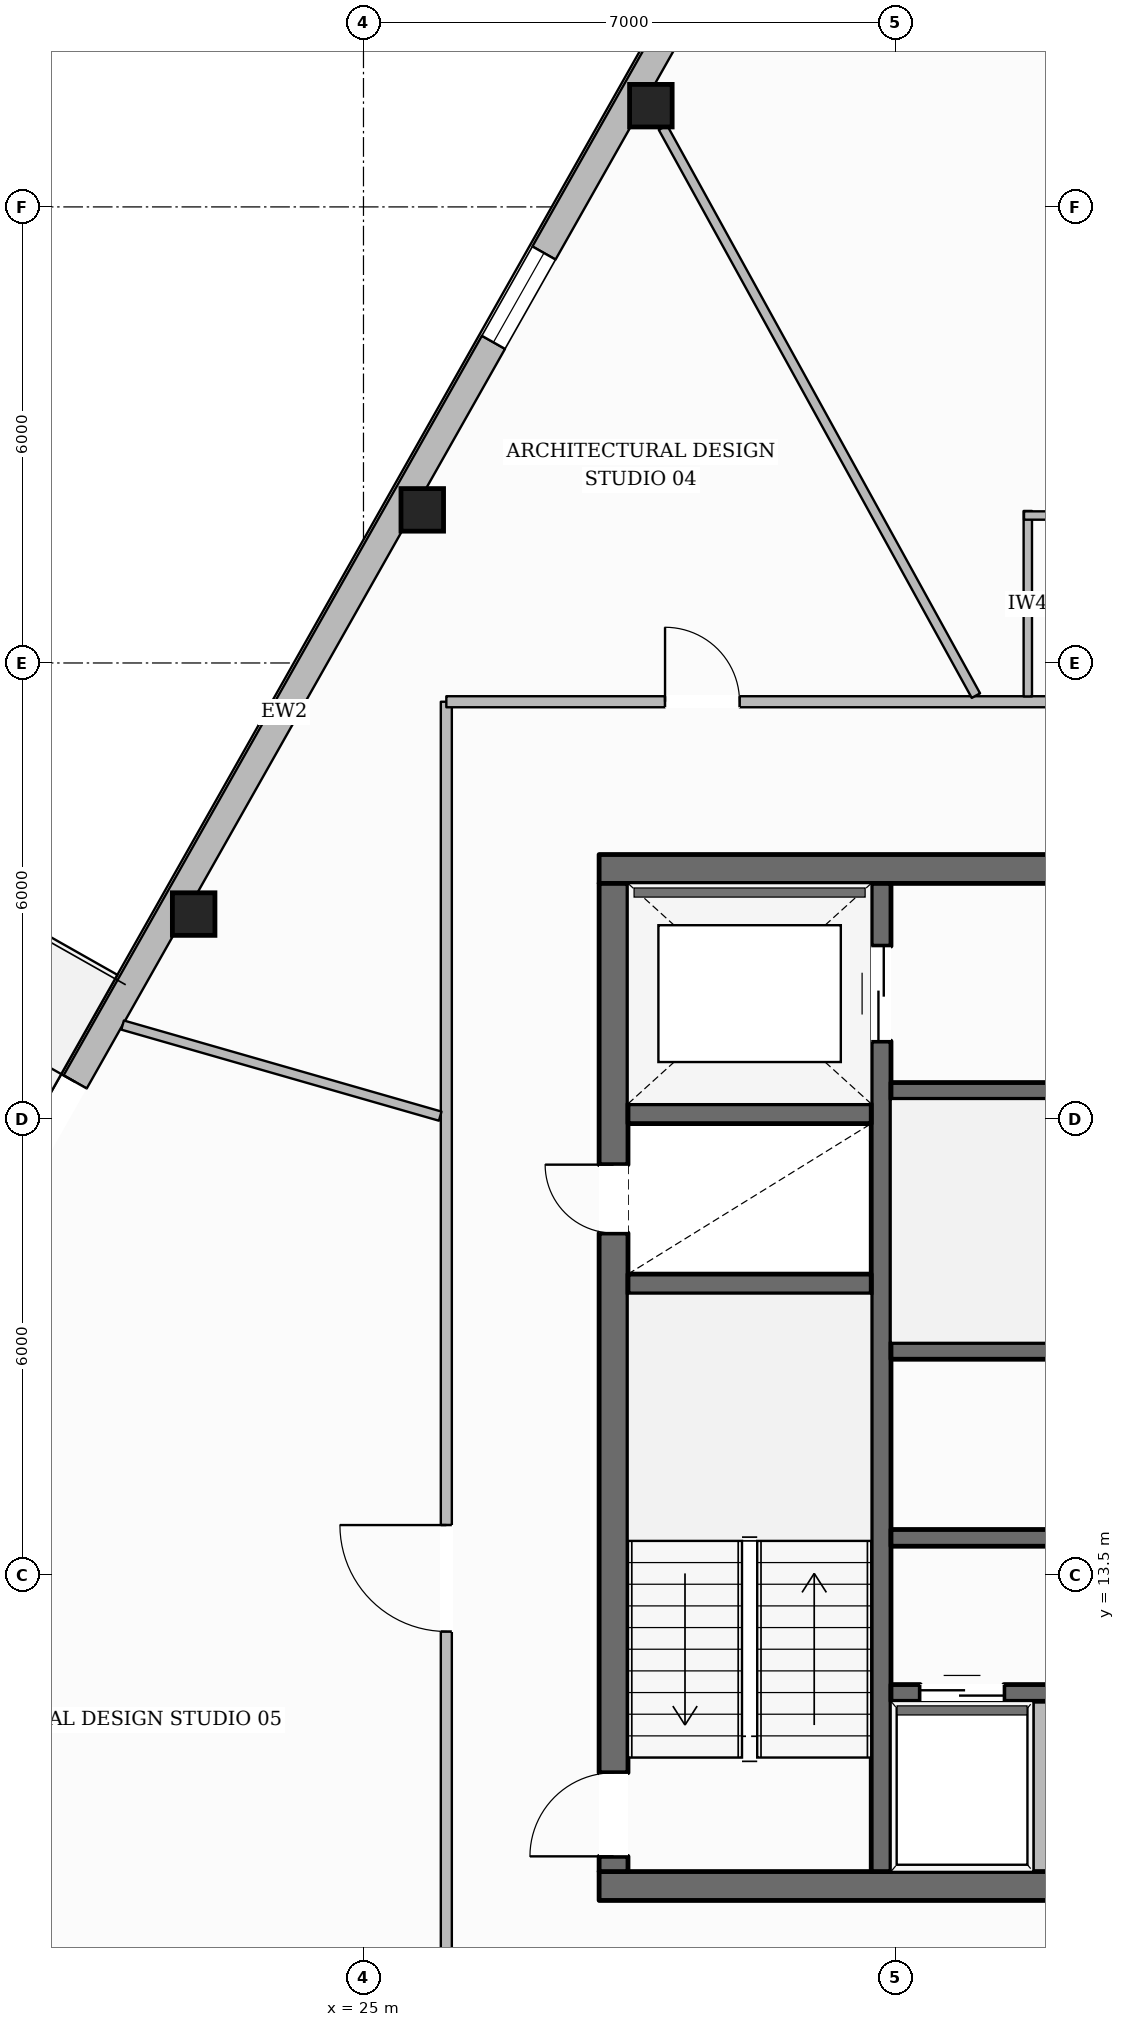
"""IFC4 building model, lengths in metres.
Left out: names, types, materials, properties, quantities, classifications, styles, units other than length and angle.
Written with IfcOpenShell. Run it as: python <this file> out.ifc"""

import sys

from ifc_helpers import new_model, si_unit, direction, frame, frame_2d, origin, origin_2d, place, context, subcontext, project, spatial, rectangle, hollow_rectangle, extrude, element, fill, save


model = new_model("IFC4")
c1 = context("Model", 3, precision=1e-05, world=origin(), true_north=direction((0.0, 1.0)))
c2 = subcontext(c1, "Body", "Model", "MODEL_VIEW")
j1 = project(units=[si_unit("LENGTHUNIT", "METRE"), si_unit("PLANEANGLEUNIT", "RADIAN")], contexts=[c1])
p1 = place(None, origin())
s1 = spatial("IfcSite", under=j1, at=p1, CompositionType="ELEMENT")
p2 = place(p1, origin())
s2 = spatial("IfcBuilding", under=s1, at=p2, CompositionType="ELEMENT")
p3 = place(p2, frame((0.0, 0.0, 247.2)))
s3 = spatial("IfcBuildingStorey", under=s2, at=p3, CompositionType="ELEMENT", Elevation=247.2)
p4 = place(p3, frame((28.1, 9.41, 0.0), z_axis=(0.0, 0.0, 1.0), x_axis=(1.0, 0.0, 0.0)))
e1 = element("IfcWall", 1, at=p4, inside=s3, PredefinedType="SOLIDWALL", context=c2, shape_type="SweptSolid", body=[
    extrude(rectangle(XDim=19.8, YDim=0.38, at=frame_2d((9.9, 0.0))), origin(), (0.0, 0.0, 1.0), 3.61),
])
p5 = place(p4, frame((10.4, 0.0, 0.0)))
e2 = element("IfcOpeningElement", 2, at=p5, cuts=e1, PredefinedType="OPENING", context=c2, shape_type="SweptSolid", body=[
    extrude(rectangle(XDim=1.4, YDim=2.2, at=frame_2d((0.7, 1.1))), frame((0.0, 0.2, 0.0), z_axis=(0.0, -1.0, 0.0), x_axis=(1.0, 0.0, 0.0)), (0.0, 0.0, 1.0), 0.4),
])
p6 = place(p3, frame((28.1, 22.79, 0.0), z_axis=(0.0, 0.0, 1.0), x_axis=(1.0, 0.0, 0.0)))
e3 = element("IfcWall", 3, at=p6, inside=s3, PredefinedType="SOLIDWALL", context=c2, shape_type="SweptSolid", body=[
    extrude(rectangle(XDim=19.8, YDim=0.38, at=frame_2d((9.9, 0.0))), origin(), (0.0, 0.0, 1.0), 3.61),
])
p7 = place(p6, frame((6.175, 0.0, 0.0)))
e4 = element("IfcOpeningElement", 4, at=p7, cuts=e3, PredefinedType="OPENING", context=c2, shape_type="SweptSolid", body=[
    extrude(rectangle(XDim=1.05, YDim=2.15, at=frame_2d((0.525, 1.075))), frame((0.0, 0.2, 0.0), z_axis=(0.0, -1.0, 0.0), x_axis=(1.0, 0.0, 0.0)), (0.0, 0.0, 1.0), 0.4),
])
p8 = place(p6, frame((12.575, 0.0, 0.0)))
e5 = element("IfcOpeningElement", 5, at=p8, cuts=e3, PredefinedType="OPENING", context=c2, shape_type="SweptSolid", body=[
    extrude(rectangle(XDim=1.05, YDim=2.15, at=frame_2d((0.525, 1.075))), frame((0.0, 0.2, 0.0), z_axis=(0.0, -1.0, 0.0), x_axis=(1.0, 0.0, 0.0)), (0.0, 0.0, 1.0), 0.4),
])
p9 = place(p3, frame((28.29, 9.6, 0.0), z_axis=(0.0, 0.0, 1.0), x_axis=(0.0, 1.0, 0.0)))
e6 = element("IfcWall", 6, at=p9, inside=s3, PredefinedType="SOLIDWALL", context=c2, shape_type="SweptSolid", body=[
    extrude(rectangle(XDim=13.0, YDim=0.38, at=frame_2d((6.5, 0.0))), origin(), (0.0, 0.0, 1.0), 3.61),
])
p10 = place(p9, frame((0.2, 0.0, 0.0)))
e7 = element("IfcOpeningElement", 7, at=p10, cuts=e6, PredefinedType="OPENING", context=c2, shape_type="SweptSolid", body=[
    extrude(rectangle(XDim=1.1, YDim=2.15, at=frame_2d((0.55, 1.075))), frame((0.0, 0.2, 0.0), z_axis=(0.0, -1.0, 0.0), x_axis=(1.0, 0.0, 0.0)), (0.0, 0.0, 1.0), 0.4),
])
p11 = place(p9, frame((8.4, 0.0, 0.0)))
e8 = element("IfcOpeningElement", 8, at=p11, cuts=e6, PredefinedType="OPENING", context=c2, shape_type="SweptSolid", body=[
    extrude(rectangle(XDim=0.9, YDim=2.1, at=frame_2d((0.45, 1.05))), frame((0.0, 0.2, 0.0), z_axis=(0.0, -1.0, 0.0), x_axis=(1.0, 0.0, 0.0)), (0.0, 0.0, 1.0), 0.4),
])
p12 = place(p3, frame((31.81, 9.6, 0.0), z_axis=(0.0, 0.0, 1.0), x_axis=(0.0, 1.0, 0.0)))
e9 = element("IfcWall", 9, at=p12, inside=s3, PredefinedType="SHEAR", context=c2, shape_type="SweptSolid", body=[
    extrude(rectangle(XDim=13.0, YDim=0.26, at=frame_2d((6.5, 0.0))), origin(), (0.0, 0.0, 1.0), 3.61),
])
p13 = place(p12, frame((10.925, 0.0, 0.0)))
e10 = element("IfcOpeningElement", 10, at=p13, cuts=e9, PredefinedType="OPENING", context=c2, shape_type="SweptSolid", body=[
    extrude(rectangle(XDim=1.25, YDim=2.25, at=frame_2d((0.625, 1.125))), frame((0.0, 0.14, 0.0), z_axis=(0.0, -1.0, 0.0), x_axis=(1.0, 0.0, 0.0)), (0.0, 0.0, 1.0), 0.28),
])
for number, where, z_axis, x_axis in (
    (11, (28.48, 17.33, 0.0), (0.0, 0.0, 1.0), (1.0, 0.0, 0.0)),
    (12, (28.48, 19.57, 0.0), (0.0, 0.0, 1.0), (1.0, 0.0, 0.0)),
):
    element("IfcWall", number, at=place(p3, frame(where, z_axis=z_axis, x_axis=x_axis)), inside=s3, PredefinedType="SHEAR", context=c2, shape_type="SweptSolid", body=[
        extrude(rectangle(XDim=3.2, YDim=0.26, at=frame_2d((1.6, 0.0))), origin(), (0.0, 0.0, 1.0), 3.61),
    ])
p14 = place(p3, frame((31.94, 19.87, 0.0), z_axis=(0.0, 0.0, 1.0), x_axis=(1.0, 0.0, 0.0)))
e13 = element("IfcWall", 13, at=p14, inside=s3, PredefinedType="SOLIDWALL", context=c2, shape_type="SweptSolid", body=[
    extrude(rectangle(XDim=12.12, YDim=0.22, at=frame_2d((6.06, 0.0))), origin(), (0.0, 0.0, 1.0), 3.61),
])
p15 = place(p14, frame((6.3, 0.0, 0.0)))
e14 = element("IfcOpeningElement", 14, at=p15, cuts=e13, PredefinedType="OPENING", context=c2, shape_type="SweptSolid", body=[
    extrude(rectangle(XDim=1.1, YDim=2.15, at=frame_2d((0.55, 1.075))), frame((0.0, 0.12, 0.0), z_axis=(0.0, -1.0, 0.0), x_axis=(1.0, 0.0, 0.0)), (0.0, 0.0, 1.0), 0.24),
])
p16 = place(p14, frame((8.23, 0.0, 0.0)))
e15 = element("IfcOpeningElement", 15, at=p16, cuts=e13, PredefinedType="OPENING", context=c2, shape_type="SweptSolid", body=[
    extrude(rectangle(XDim=0.9, YDim=2.1, at=frame_2d((0.45, 1.05))), frame((0.0, 0.12, 0.0), z_axis=(0.0, -1.0, 0.0), x_axis=(1.0, 0.0, 0.0)), (0.0, 0.0, 1.0), 0.24),
])
p17 = place(p14, frame((10.45, 0.0, 0.0)))
e16 = element("IfcOpeningElement", 16, at=p17, cuts=e13, PredefinedType="OPENING", context=c2, shape_type="SweptSolid", body=[
    extrude(rectangle(XDim=0.9, YDim=2.1, at=frame_2d((0.45, 1.05))), frame((0.0, 0.12, 0.0), z_axis=(0.0, -1.0, 0.0), x_axis=(1.0, 0.0, 0.0)), (0.0, 0.0, 1.0), 0.24),
])
p18 = place(p3, frame((31.94, 16.45, 0.0), z_axis=(0.0, 0.0, 1.0), x_axis=(1.0, 0.0, 0.0)))
e17 = element("IfcWall", 17, at=p18, inside=s3, PredefinedType="SOLIDWALL", context=c2, shape_type="SweptSolid", body=[
    extrude(rectangle(XDim=12.12, YDim=0.22, at=frame_2d((6.06, 0.0))), origin(), (0.0, 0.0, 1.0), 3.61),
])
p19 = place(p3, frame((31.94, 13.99, 0.0), z_axis=(0.0, 0.0, 1.0), x_axis=(1.0, 0.0, 0.0)))
e18 = element("IfcWall", 18, at=p19, inside=s3, PredefinedType="SOLIDWALL", context=c2, shape_type="SweptSolid", body=[
    extrude(rectangle(XDim=12.12, YDim=0.22, at=frame_2d((6.06, 0.0))), origin(), (0.0, 0.0, 1.0), 3.61),
])
p20 = place(p19, frame((3.11, 0.0, 0.0)))
e19 = element("IfcOpeningElement", 19, at=p20, cuts=e18, PredefinedType="OPENING", context=c2, shape_type="SweptSolid", body=[
    extrude(rectangle(XDim=0.9, YDim=2.1, at=frame_2d((0.45, 1.05))), frame((0.0, 0.12, 0.0), z_axis=(0.0, -1.0, 0.0), x_axis=(1.0, 0.0, 0.0)), (0.0, 0.0, 1.0), 0.24),
])
p21 = place(p19, frame((9.21, 0.0, 0.0)))
e20 = element("IfcOpeningElement", 20, at=p21, cuts=e18, PredefinedType="OPENING", context=c2, shape_type="SweptSolid", body=[
    extrude(rectangle(XDim=0.9, YDim=2.1, at=frame_2d((0.45, 1.05))), frame((0.0, 0.12, 0.0), z_axis=(0.0, -1.0, 0.0), x_axis=(1.0, 0.0, 0.0)), (0.0, 0.0, 1.0), 0.24),
])
p22 = place(p3, frame((31.94, 11.95, 0.0), z_axis=(0.0, 0.0, 1.0), x_axis=(1.0, 0.0, 0.0)))
e21 = element("IfcWall", 21, at=p22, inside=s3, PredefinedType="SOLIDWALL", context=c2, shape_type="SweptSolid", body=[
    extrude(rectangle(XDim=6.19, YDim=0.22, at=frame_2d((3.095, 0.0))), origin(), (0.0, 0.0, 1.0), 3.61),
])
p23 = place(p22, frame((0.385, 0.0, 0.0)))
e22 = element("IfcOpeningElement", 22, at=p23, cuts=e21, PredefinedType="OPENING", context=c2, shape_type="SweptSolid", body=[
    extrude(rectangle(XDim=1.1, YDim=2.2, at=frame_2d((0.55, 1.1))), frame((0.0, 0.12, 0.0), z_axis=(0.0, -1.0, 0.0), x_axis=(1.0, 0.0, 0.0)), (0.0, 0.0, 1.0), 0.24),
])
p24 = place(p22, frame((2.435, 0.0, 0.0)))
e23 = element("IfcOpeningElement", 23, at=p24, cuts=e21, PredefinedType="OPENING", context=c2, shape_type="SweptSolid", body=[
    extrude(rectangle(XDim=1.1, YDim=2.2, at=frame_2d((0.55, 1.1))), frame((0.0, 0.12, 0.0), z_axis=(0.0, -1.0, 0.0), x_axis=(1.0, 0.0, 0.0)), (0.0, 0.0, 1.0), 0.24),
])
p25 = place(p22, frame((4.485, 0.0, 0.0)))
e24 = element("IfcOpeningElement", 24, at=p25, cuts=e21, PredefinedType="OPENING", context=c2, shape_type="SweptSolid", body=[
    extrude(rectangle(XDim=1.1, YDim=2.2, at=frame_2d((0.55, 1.1))), frame((0.0, 0.12, 0.0), z_axis=(0.0, -1.0, 0.0), x_axis=(1.0, 0.0, 0.0)), (0.0, 0.0, 1.0), 0.24),
])
for number, where, z_axis, x_axis in (
    (25, (28.781, 32.832, 0.0), (0.0, 0.0, 1.0), (1.0, 0.0, 0.0)),
    (26, (25.773, 27.514, 0.0), (0.0, 0.0, 1.0), (1.0, 0.0, 0.0)),
    (27, (22.766, 22.197, 0.0), (0.0, 0.0, 1.0), (1.0, 0.0, 0.0)),
):
    element("IfcColumn", number, at=place(p3, frame(where, z_axis=z_axis, x_axis=x_axis)), inside=s3, PredefinedType="COLUMN", context=c2, shape_type="SweptSolid", body=[
        extrude(hollow_rectangle(XDim=0.56, YDim=0.56, WallThickness=0.025, at=origin_2d()), origin(), (0.0, 0.0, 1.0), 3.61),
    ])
p26 = place(p3, frame((16.282, 11.281, 0.0), z_axis=(0.0, 0.0, 1.0), x_axis=(0.492304911919, 0.870422813178, 0.0)))
e28 = element("IfcWall", 28, at=p26, inside=s3, PredefinedType="STANDARD", context=c2, shape_type="SweptSolid", body=[
    extrude(rectangle(XDim=37.613, YDim=0.35, at=frame_2d((18.807, 0.0))), origin(), (0.0, 0.0, 1.0), 3.196),
])
p27 = place(p26, frame((9.003, 0.0, 0.0)))
e29 = element("IfcOpeningElement", 29, at=p27, cuts=e28, PredefinedType="OPENING", context=c2, shape_type="SweptSolid", body=[
    extrude(rectangle(XDim=1.0, YDim=2.2, at=frame_2d((0.5, 1.1))), frame((0.0, 0.185, 0.0), z_axis=(0.0, -1.0, 0.0), x_axis=(1.0, 0.0, 0.0)), (0.0, 0.0, 1.0), 0.37),
])
p28 = place(p26, frame((33.4, 0.0, 0.65)))
e30 = element("IfcOpeningElement", 30, at=p28, cuts=e28, PredefinedType="OPENING", context=c2, shape_type="SweptSolid", body=[
    extrude(rectangle(XDim=1.35, YDim=1.75, at=frame_2d((0.675, 0.875))), frame((0.0, 0.185, 0.0), z_axis=(0.0, -1.0, 0.0), x_axis=(1.0, 0.0, 0.0)), (0.0, 0.0, 1.0), 0.37),
])
p29 = place(p26, frame((27.291, 0.0, 0.65)))
e31 = element("IfcOpeningElement", 31, at=p29, cuts=e28, PredefinedType="OPENING", context=c2, shape_type="SweptSolid", body=[
    extrude(rectangle(XDim=1.35, YDim=1.75, at=frame_2d((0.675, 0.875))), frame((0.0, 0.185, 0.0), z_axis=(0.0, -1.0, 0.0), x_axis=(1.0, 0.0, 0.0)), (0.0, 0.0, 1.0), 0.37),
])
p30 = place(p26, frame((21.182, 0.0, 0.65)))
e32 = element("IfcOpeningElement", 32, at=p30, cuts=e28, PredefinedType="OPENING", context=c2, shape_type="SweptSolid", body=[
    extrude(rectangle(XDim=1.35, YDim=1.75, at=frame_2d((0.675, 0.875))), frame((0.0, 0.185, 0.0), z_axis=(0.0, -1.0, 0.0), x_axis=(1.0, 0.0, 0.0)), (0.0, 0.0, 1.0), 0.37),
])
p31 = place(p26, frame((2.854, 0.0, 0.65)))
e33 = element("IfcOpeningElement", 33, at=p31, cuts=e28, PredefinedType="OPENING", context=c2, shape_type="SweptSolid", body=[
    extrude(rectangle(XDim=1.35, YDim=1.75, at=frame_2d((0.675, 0.875))), frame((0.0, 0.185, 0.0), z_axis=(0.0, -1.0, 0.0), x_axis=(1.0, 0.0, 0.0)), (0.0, 0.0, 1.0), 0.37),
])
p32 = place(p3, frame((33.9, 9.49, 0.0), z_axis=(0.0, 0.0, 1.0), x_axis=(0.0, 1.0, 0.0)))
e34 = element("IfcWall", 34, at=p32, inside=s3, PredefinedType="PARTITIONING", context=c2, shape_type="SweptSolid", body=[
    extrude(rectangle(XDim=2.35, YDim=0.165, at=frame_2d((1.175, 0.0))), origin(), (0.0, 0.0, 1.0), 3.61),
])
p33 = place(p3, frame((26.09, 7.21, 0.0), z_axis=(0.0, 0.0, 1.0), x_axis=(0.0, 1.0, 0.0)))
e35 = element("IfcWall", 35, at=p33, inside=s3, PredefinedType="PARTITIONING", context=c2, shape_type="SweptSolid", body=[
    extrude(rectangle(XDim=17.78, YDim=0.145, at=frame_2d((8.89, 0.0))), origin(), (0.0, 0.0, 1.0), 3.349),
])
p34 = place(p33, frame((5.549, 0.0, 0.0)))
e36 = element("IfcOpeningElement", 36, at=p34, cuts=e35, PredefinedType="OPENING", context=c2, shape_type="SweptSolid", body=[
    extrude(rectangle(XDim=1.4, YDim=2.2, at=frame_2d((0.7, 1.1))), frame((0.0, 0.083, 0.0), z_axis=(0.0, -1.0, 0.0), x_axis=(1.0, 0.0, 0.0)), (0.0, 0.0, 1.0), 0.165),
])
p35 = place(p3, frame((26.09, 24.99, 0.0), z_axis=(0.0, 0.0, 1.0), x_axis=(1.0, 0.0, 0.0)))
e37 = element("IfcWall", 37, at=p35, inside=s3, PredefinedType="PARTITIONING", context=c2, shape_type="SweptSolid", body=[
    extrude(rectangle(XDim=17.11, YDim=0.145, at=frame_2d((8.555, 0.0))), origin(), (0.0, 0.0, 1.0), 3.61),
])
p36 = place(p35, frame((8.47, 0.0, 0.0)))
e38 = element("IfcOpeningElement", 38, at=p36, cuts=e37, PredefinedType="OPENING", context=c2, shape_type="SweptSolid", body=[
    extrude(rectangle(XDim=0.88, YDim=2.1, at=frame_2d((0.44, 1.05))), frame((0.0, 0.083, 0.0), z_axis=(0.0, -1.0, 0.0), x_axis=(1.0, 0.0, 0.0)), (0.0, 0.0, 1.0), 0.165),
])
p37 = place(p35, frame((10.99, 0.0, 0.0)))
e39 = element("IfcOpeningElement", 39, at=p37, cuts=e37, PredefinedType="OPENING", context=c2, shape_type="SweptSolid", body=[
    extrude(rectangle(XDim=0.88, YDim=2.1, at=frame_2d((0.44, 1.05))), frame((0.0, 0.083, 0.0), z_axis=(0.0, -1.0, 0.0), x_axis=(1.0, 0.0, 0.0)), (0.0, 0.0, 1.0), 0.165),
])
p38 = place(p35, frame((13.37, 0.0, 0.0)))
e40 = element("IfcOpeningElement", 40, at=p38, cuts=e37, PredefinedType="OPENING", context=c2, shape_type="SweptSolid", body=[
    extrude(rectangle(XDim=0.96, YDim=2.1, at=frame_2d((0.48, 1.05))), frame((0.0, 0.083, 0.0), z_axis=(0.0, -1.0, 0.0), x_axis=(1.0, 0.0, 0.0)), (0.0, 0.0, 1.0), 0.165),
])
p39 = place(p35, frame((2.877, 0.0, 0.0)))
e41 = element("IfcOpeningElement", 41, at=p39, cuts=e37, PredefinedType="OPENING", context=c2, shape_type="SweptSolid", body=[
    extrude(rectangle(XDim=0.98, YDim=2.15, at=frame_2d((0.49, 1.075))), frame((0.0, 0.083, 0.0), z_axis=(0.0, -1.0, 0.0), x_axis=(1.0, 0.0, 0.0)), (0.0, 0.0, 1.0), 0.165),
])
p40 = place(p3, frame((33.74, 25.06, 0.0), z_axis=(0.0, 0.0, 1.0), x_axis=(0.0, 1.0, 0.0)))
e42 = element("IfcWall", 42, at=p40, inside=s3, PredefinedType="PLUMBINGWALL", context=c2, shape_type="SweptSolid", body=[
    extrude(rectangle(XDim=2.44, YDim=0.11, at=frame_2d((1.22, 0.0))), origin(), (0.0, 0.0, 1.0), 3.61),
])
p41 = place(p3, frame((33.69, 27.44, 0.0), z_axis=(0.0, 0.0, 1.0), x_axis=(1.0, 0.0, 0.0)))
e43 = element("IfcWall", 43, at=p41, inside=s3, PredefinedType="PLUMBINGWALL", context=c2, shape_type="SweptSolid", body=[
    extrude(rectangle(XDim=7.46, YDim=0.11, at=frame_2d((3.73, 0.0))), origin(), (0.0, 0.0, 1.0), 3.61),
])
p42 = place(p3, frame((33.057, 25.071, 0.0), z_axis=(0.0, 0.0, 1.0), x_axis=(-0.482588627841, 0.875847142074, 0.0)))
e44 = element("IfcWall", 44, at=p42, inside=s3, PredefinedType="PARTITIONING", context=c2, shape_type="SweptSolid", body=[
    extrude(rectangle(XDim=8.532, YDim=0.125, at=frame_2d((4.266, 0.0))), origin(), (0.0, 0.0, 1.0), 3.246),
])
p43 = place(p3, frame((26.01, 19.538, 0.0), z_axis=(0.0, 0.0, 1.0), x_axis=(-0.961260714154, 0.275640779684, 0.0)))
e45 = element("IfcWall", 45, at=p43, inside=s3, PredefinedType="PARTITIONING", context=c2, shape_type="SweptSolid", body=[
    extrude(rectangle(XDim=4.347, YDim=0.125, at=frame_2d((2.174, 0.0))), origin(), (0.0, 0.0, 1.0), 3.61),
])
p44 = place(p27, origin())
e46 = element("IfcDoor", 46, at=p44, inside=s3, OperationType="SINGLE_SWING_RIGHT", PredefinedType="DOOR", context=c2, shape_type="SweptSolid", body=[
    extrude(rectangle(XDim=1.0, YDim=2.2, at=frame_2d((0.5, 1.1))), frame((0.0, 0.025, 0.0), z_axis=(0.0, -1.0, 0.0), x_axis=(1.0, 0.0, 0.0)), (0.0, 0.0, 1.0), 0.05),
])
fill(e29, e46)
p45 = place(p30, origin())
e47 = element("IfcWindow", 47, at=p45, inside=s3, PartitioningType="SINGLE_PANEL", PredefinedType="WINDOW", context=c2, shape_type="SweptSolid", body=[
    extrude(rectangle(XDim=1.35, YDim=1.75, at=frame_2d((0.675, 0.875))), frame((0.0, 0.03, 0.0), z_axis=(0.0, -1.0, 0.0), x_axis=(1.0, 0.0, 0.0)), (0.0, 0.0, 1.0), 0.06),
])
fill(e32, e47)
p46 = place(p10, origin())
e48 = element("IfcDoor", 48, at=p46, inside=s3, OperationType="SINGLE_SWING_LEFT", PredefinedType="DOOR", context=c2, shape_type="SweptSolid", body=[
    extrude(rectangle(XDim=1.1, YDim=2.15, at=frame_2d((0.55, 1.075))), frame((0.0, 0.025, 0.0), z_axis=(0.0, -1.0, 0.0), x_axis=(1.0, 0.0, 0.0)), (0.0, 0.0, 1.0), 0.05),
])
fill(e7, e48)
p47 = place(p11, origin())
e49 = element("IfcDoor", 49, at=p47, inside=s3, OperationType="SINGLE_SWING_RIGHT", PredefinedType="DOOR", context=c2, shape_type="SweptSolid", body=[
    extrude(rectangle(XDim=0.9, YDim=2.1, at=frame_2d((0.45, 1.05))), frame((0.0, 0.025, 0.0), z_axis=(0.0, -1.0, 0.0), x_axis=(1.0, 0.0, 0.0)), (0.0, 0.0, 1.0), 0.05),
])
fill(e8, e49)
p48 = place(p13, origin())
e50 = element("IfcDoor", 50, at=p48, inside=s3, OperationType="DOUBLE_DOOR_SLIDING", PredefinedType="DOOR", context=c2, shape_type="SweptSolid", body=[
    extrude(rectangle(XDim=1.25, YDim=2.25, at=frame_2d((0.625, 1.125))), frame((0.0, 0.025, 0.0), z_axis=(0.0, -1.0, 0.0), x_axis=(1.0, 0.0, 0.0)), (0.0, 0.0, 1.0), 0.05),
])
fill(e10, e50)
p49 = place(p23, origin())
e51 = element("IfcDoor", 51, at=p49, inside=s3, OperationType="DOUBLE_DOOR_SLIDING", PredefinedType="DOOR", context=c2, shape_type="SweptSolid", body=[
    extrude(rectangle(XDim=1.1, YDim=2.2, at=frame_2d((0.55, 1.1))), frame((0.0, 0.025, 0.0), z_axis=(0.0, -1.0, 0.0), x_axis=(1.0, 0.0, 0.0)), (0.0, 0.0, 1.0), 0.05),
])
fill(e22, e51)
p50 = place(p39, origin())
e52 = element("IfcDoor", 52, at=p50, inside=s3, OperationType="SINGLE_SWING_LEFT", PredefinedType="DOOR", context=c2, shape_type="SweptSolid", body=[
    extrude(rectangle(XDim=0.98, YDim=2.15, at=frame_2d((0.49, 1.075))), frame((0.0, 0.025, 0.0), z_axis=(0.0, -1.0, 0.0), x_axis=(1.0, 0.0, 0.0)), (0.0, 0.0, 1.0), 0.05),
])
fill(e41, e52)
p51 = place(p34, origin())
e53 = element("IfcDoor", 53, at=p51, inside=s3, OperationType="SINGLE_SWING_RIGHT", PredefinedType="DOOR", context=c2, shape_type="SweptSolid", body=[
    extrude(rectangle(XDim=1.4, YDim=2.2, at=frame_2d((0.7, 1.1))), frame((0.0, 0.025, 0.0), z_axis=(0.0, -1.0, 0.0), x_axis=(1.0, 0.0, 0.0)), (0.0, 0.0, 1.0), 0.05),
])
fill(e36, e53)
save(model, sys.argv[1])
